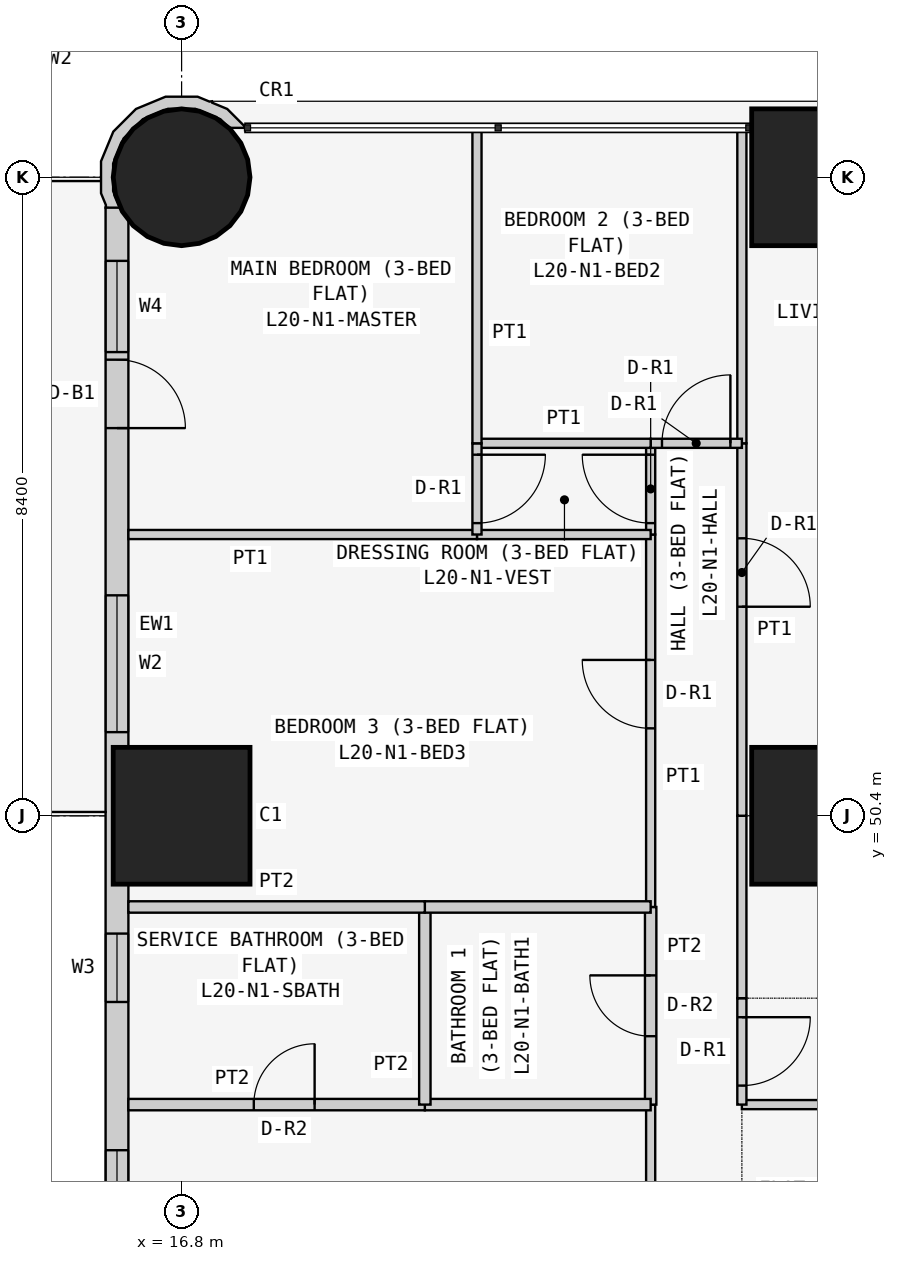
"""IFC4 building model, lengths in metres.
Left out: names, types, materials, properties, quantities, classifications, styles, units other than length and angle.
Written with IfcOpenShell. Run it as: python <this file> out.ifc"""

import sys

from ifc_helpers import new_model, si_unit, direction, frame, frame_2d, origin, origin_2d, place, context, subcontext, project, spatial, polyline, rectangle, circle, outline, extrude, element, fill, save


model = new_model("IFC4")
c1 = context("Model", 3, precision=1e-05, world=origin(), true_north=direction((0.0, 1.0)))
c2 = subcontext(c1, "Body", "Model", "MODEL_VIEW")
j1 = project(units=[si_unit("LENGTHUNIT", "METRE"), si_unit("PLANEANGLEUNIT", "RADIAN")], contexts=[c1])
p1 = place(None, origin())
s1 = spatial("IfcSite", under=j1, at=p1, CompositionType="ELEMENT")
p2 = place(p1, origin())
s2 = spatial("IfcBuilding", under=s1, at=p2, CompositionType="ELEMENT")
p3 = place(p2, frame((0.0, 0.0, 81.3)))
s3 = spatial("IfcBuildingStorey", under=s2, at=p3, CompositionType="ELEMENT", Elevation=81.3)
p4 = place(p3, frame((16.8, 50.4, 0.0), z_axis=(0.0, 0.0, 1.0), x_axis=(1.0, 0.0, 0.0)))
e1 = element("IfcColumn", 1, at=p4, inside=s3, PredefinedType="COLUMN", context=c2, shape_type="SweptSolid", body=[
    extrude(rectangle(XDim=1.8, YDim=1.8, at=origin_2d()), origin(), (0.0, 0.0, 1.0), 3.6),
])
p5 = place(p3, frame((16.8, 58.8, 0.0), z_axis=(0.0, 0.0, 1.0), x_axis=(1.0, 0.0, 0.0)))
e2 = element("IfcColumn", 2, at=p5, inside=s3, PredefinedType="COLUMN", context=c2, shape_type="SweptSolid", body=[
    extrude(circle(Radius=0.9, at=origin_2d()), origin(), (0.0, 0.0, 1.0), 3.6),
])
for number, where, z_axis, x_axis in (
    (3, (25.2, 50.4, 0.0), (0.0, 0.0, 1.0), (1.0, 0.0, 0.0)),
    (4, (25.2, 58.8, 0.0), (0.0, 0.0, 1.0), (1.0, 0.0, 0.0)),
):
    element("IfcColumn", number, at=place(p3, frame(where, z_axis=z_axis, x_axis=x_axis)), inside=s3, PredefinedType="COLUMN", context=c2, shape_type="SweptSolid", body=[
        extrude(rectangle(XDim=1.8, YDim=1.8, at=origin_2d()), origin(), (0.0, 0.0, 1.0), 3.6),
    ])
p6 = place(p3, frame((15.95, 58.4, 0.0), z_axis=(0.0, 0.0, 1.0), x_axis=(0.0, -1.0, 0.0)))
e5 = element("IfcWall", 5, at=p6, inside=s3, PredefinedType="SOLIDWALL", context=c2, shape_type="SweptSolid", body=[
    extrude(rectangle(XDim=15.7, YDim=0.3, at=frame_2d((7.85, 0.0))), origin(), (0.0, 0.0, 1.0), 3.45),
])
p7 = place(p6, frame((12.4, 0.0, 0.9)))
e6 = element("IfcOpeningElement", 6, at=p7, cuts=e5, PredefinedType="OPENING", context=c2, shape_type="SweptSolid", body=[
    extrude(rectangle(XDim=1.8, YDim=1.5, at=frame_2d((0.9, 0.75))), frame((0.0, 0.16, 0.0), z_axis=(0.0, -1.0, 0.0), x_axis=(1.0, 0.0, 0.0)), (0.0, 0.0, 1.0), 0.32),
])
p8 = place(p6, frame((9.55, 0.0, 1.5)))
e7 = element("IfcOpeningElement", 7, at=p8, cuts=e5, PredefinedType="OPENING", context=c2, shape_type="SweptSolid", body=[
    extrude(rectangle(XDim=0.9, YDim=0.7, at=frame_2d((0.45, 0.35))), frame((0.0, 0.16, 0.0), z_axis=(0.0, -1.0, 0.0), x_axis=(1.0, 0.0, 0.0)), (0.0, 0.0, 1.0), 0.32),
])
p9 = place(p6, frame((5.1, 0.0, 0.9)))
e8 = element("IfcOpeningElement", 8, at=p9, cuts=e5, PredefinedType="OPENING", context=c2, shape_type="SweptSolid", body=[
    extrude(rectangle(XDim=1.8, YDim=1.5, at=frame_2d((0.9, 0.75))), frame((0.0, 0.16, 0.0), z_axis=(0.0, -1.0, 0.0), x_axis=(1.0, 0.0, 0.0)), (0.0, 0.0, 1.0), 0.32),
])
p10 = place(p6, frame((2.0, 0.0, 0.0)))
e9 = element("IfcOpeningElement", 9, at=p10, cuts=e5, PredefinedType="OPENING", context=c2, shape_type="SweptSolid", body=[
    extrude(rectangle(XDim=0.9, YDim=2.4, at=frame_2d((0.45, 1.2))), frame((0.0, 0.16, 0.0), z_axis=(0.0, -1.0, 0.0), x_axis=(1.0, 0.0, 0.0)), (0.0, 0.0, 1.0), 0.32),
])
p11 = place(p6, frame((0.7, 0.0, 0.9)))
e10 = element("IfcOpeningElement", 10, at=p11, cuts=e5, PredefinedType="OPENING", context=c2, shape_type="SweptSolid", body=[
    extrude(rectangle(XDim=1.2, YDim=1.5, at=frame_2d((0.6, 0.75))), frame((0.0, 0.16, 0.0), z_axis=(0.0, -1.0, 0.0), x_axis=(1.0, 0.0, 0.0)), (0.0, 0.0, 1.0), 0.32),
])
p12 = place(p3, frame((17.567, 59.411, 0.0), z_axis=(0.0, 0.0, 1.0), x_axis=(-0.377204953059, 0.926129809145, 0.0)))
e11 = element("IfcWall", 11, at=p12, inside=s3, PredefinedType="SOLIDWALL", context=c2, shape_type="SweptSolid", body=[
    extrude(outline(polyline([(-0.27, 2.017), (-0.37, 1.841), (-0.102, 1.842), (0.23, 1.707), (0.484, 1.455), (0.624, 1.125), (0.626, 0.766), (0.491, 0.434), (0.239, 0.18), (0.09, 0.117), (0.011, -0.078), (0.024, -0.083), (0.329, 0.045), (0.48, 0.198), (0.499, 0.193), (0.508, 0.225), (0.626, 0.345), (0.785, 0.736), (0.782, 1.157), (0.619, 1.546), (0.319, 1.842), (-0.072, 2.002), (-0.24, 2.0), (-0.27, 2.017)])), origin(), (0.0, 0.0, 1.0), 3.45),
])
p13 = place(p3, frame((29.4, 46.6, 0.0), z_axis=(0.0, 0.0, 1.0), x_axis=(-1.0, 0.0, 0.0)))
e12 = element("IfcWall", 12, at=p13, inside=s3, PredefinedType="PARTITIONING", context=c2, shape_type="SweptSolid", body=[
    extrude(rectangle(XDim=5.229, YDim=0.12, at=frame_2d((2.615, 0.0))), origin(), (0.0, 0.0, 1.0), 3.45),
])
p14 = place(p3, frame((24.171, 48.0, 0.0), z_axis=(0.0, 0.0, 1.0), x_axis=(0.0, -1.0, 0.0)))
e13 = element("IfcWall", 13, at=p14, inside=s3, PredefinedType="PARTITIONING", context=c2, shape_type="SweptSolid", body=[
    extrude(rectangle(XDim=1.4, YDim=0.12, at=frame_2d((0.7, 0.0))), origin(), (0.0, 0.0, 1.0), 3.45),
])
p15 = place(p14, frame((0.25, 0.0, 0.0)))
e14 = element("IfcOpeningElement", 14, at=p15, cuts=e13, PredefinedType="OPENING", context=c2, shape_type="SweptSolid", body=[
    extrude(rectangle(XDim=0.9, YDim=2.1, at=frame_2d((0.45, 1.05))), frame((0.0, 0.07, 0.0), z_axis=(0.0, -1.0, 0.0), x_axis=(1.0, 0.0, 0.0)), (0.0, 0.0, 1.0), 0.14),
])
p16 = place(p3, frame((24.171, 50.4, 0.0), z_axis=(0.0, 0.0, 1.0), x_axis=(0.0, -1.0, 0.0)))
e15 = element("IfcWall", 15, at=p16, inside=s3, PredefinedType="PARTITIONING", context=c2, shape_type="SweptSolid", body=[
    extrude(rectangle(XDim=2.4, YDim=0.12, at=frame_2d((1.2, 0.0))), origin(), (0.0, 0.0, 1.0), 3.45),
])
p17 = place(p3, frame((24.171, 55.3, 0.0), z_axis=(0.0, 0.0, 1.0), x_axis=(0.0, -1.0, 0.0)))
e16 = element("IfcWall", 16, at=p17, inside=s3, PredefinedType="PARTITIONING", context=c2, shape_type="SweptSolid", body=[
    extrude(rectangle(XDim=4.9, YDim=0.12, at=frame_2d((2.45, 0.0))), origin(), (0.0, 0.0, 1.0), 3.45),
])
p18 = place(p17, frame((1.25, 0.0, 0.0)))
e17 = element("IfcOpeningElement", 17, at=p18, cuts=e16, PredefinedType="OPENING", context=c2, shape_type="SweptSolid", body=[
    extrude(rectangle(XDim=0.9, YDim=2.1, at=frame_2d((0.45, 1.05))), frame((0.0, 0.07, 0.0), z_axis=(0.0, -1.0, 0.0), x_axis=(1.0, 0.0, 0.0)), (0.0, 0.0, 1.0), 0.14),
])
p19 = place(p3, frame((24.171, 59.45, 0.0), z_axis=(0.0, 0.0, 1.0), x_axis=(0.0, -1.0, 0.0)))
e18 = element("IfcWall", 18, at=p19, inside=s3, PredefinedType="PARTITIONING", context=c2, shape_type="SweptSolid", body=[
    extrude(rectangle(XDim=4.15, YDim=0.12, at=frame_2d((2.075, 0.0))), origin(), (0.0, 0.0, 1.0), 3.45),
])
p20 = place(p3, frame((22.971, 46.6, 0.0), z_axis=(0.0, 0.0, 1.0), x_axis=(0.0, -1.0, 0.0)))
e19 = element("IfcWall", 19, at=p20, inside=s3, PredefinedType="PARTITIONING", context=c2, shape_type="SweptSolid", body=[
    extrude(rectangle(XDim=3.575, YDim=0.12, at=frame_2d((1.788, 0.0))), origin(), (0.0, 0.0, 1.0), 3.45),
])
p21 = place(p20, frame((1.35, 0.0, 0.0)))
e20 = element("IfcOpeningElement", 20, at=p21, cuts=e19, PredefinedType="OPENING", context=c2, shape_type="SweptSolid", body=[
    extrude(rectangle(XDim=0.9, YDim=2.1, at=frame_2d((0.45, 1.05))), frame((0.0, 0.07, 0.0), z_axis=(0.0, -1.0, 0.0), x_axis=(1.0, 0.0, 0.0)), (0.0, 0.0, 1.0), 0.14),
])
p22 = place(p3, frame((22.971, 49.2, 0.0), z_axis=(0.0, 0.0, 1.0), x_axis=(0.0, -1.0, 0.0)))
e21 = element("IfcWall", 21, at=p22, inside=s3, PredefinedType="PARTITIONING", context=c2, shape_type="SweptSolid", body=[
    extrude(rectangle(XDim=2.6, YDim=0.15, at=frame_2d((1.3, 0.0))), origin(), (0.0, 0.0, 1.0), 3.45),
])
p23 = place(p22, frame((0.9, 0.0, 0.0)))
e22 = element("IfcOpeningElement", 22, at=p23, cuts=e21, PredefinedType="OPENING", context=c2, shape_type="SweptSolid", body=[
    extrude(rectangle(XDim=0.8, YDim=2.1, at=frame_2d((0.4, 1.05))), frame((0.0, 0.085, 0.0), z_axis=(0.0, -1.0, 0.0), x_axis=(1.0, 0.0, 0.0)), (0.0, 0.0, 1.0), 0.17),
])
p24 = place(p3, frame((22.971, 54.1, 0.0), z_axis=(0.0, 0.0, 1.0), x_axis=(0.0, -1.0, 0.0)))
e23 = element("IfcWall", 23, at=p24, inside=s3, PredefinedType="PARTITIONING", context=c2, shape_type="SweptSolid", body=[
    extrude(rectangle(XDim=4.9, YDim=0.12, at=frame_2d((2.45, 0.0))), origin(), (0.0, 0.0, 1.0), 3.45),
])
p25 = place(p24, frame((1.65, 0.0, 0.0)))
e24 = element("IfcOpeningElement", 24, at=p25, cuts=e23, PredefinedType="OPENING", context=c2, shape_type="SweptSolid", body=[
    extrude(rectangle(XDim=0.9, YDim=2.1, at=frame_2d((0.45, 1.05))), frame((0.0, 0.07, 0.0), z_axis=(0.0, -1.0, 0.0), x_axis=(1.0, 0.0, 0.0)), (0.0, 0.0, 1.0), 0.14),
])
p26 = place(p3, frame((22.971, 55.3, 0.0), z_axis=(0.0, 0.0, 1.0), x_axis=(0.0, -1.0, 0.0)))
e25 = element("IfcWall", 25, at=p26, inside=s3, PredefinedType="PARTITIONING", context=c2, shape_type="SweptSolid", body=[
    extrude(rectangle(XDim=1.2, YDim=0.12, at=frame_2d((0.6, 0.0))), origin(), (0.0, 0.0, 1.0), 3.45),
])
p27 = place(p26, frame((0.15, 0.0, 0.0)))
e26 = element("IfcOpeningElement", 26, at=p27, cuts=e25, PredefinedType="OPENING", context=c2, shape_type="SweptSolid", body=[
    extrude(rectangle(XDim=0.9, YDim=2.1, at=frame_2d((0.45, 1.05))), frame((0.0, 0.07, 0.0), z_axis=(0.0, -1.0, 0.0), x_axis=(1.0, 0.0, 0.0)), (0.0, 0.0, 1.0), 0.14),
])
p28 = place(p3, frame((24.171, 55.3, 0.0), z_axis=(0.0, 0.0, 1.0), x_axis=(-1.0, 0.0, 0.0)))
e27 = element("IfcWall", 27, at=p28, inside=s3, PredefinedType="PARTITIONING", context=c2, shape_type="SweptSolid", body=[
    extrude(rectangle(XDim=1.2, YDim=0.12, at=frame_2d((0.6, 0.0))), origin(), (0.0, 0.0, 1.0), 3.45),
])
p29 = place(p28, frame((0.151, 0.0, 0.0)))
e28 = element("IfcOpeningElement", 28, at=p29, cuts=e27, PredefinedType="OPENING", context=c2, shape_type="SweptSolid", body=[
    extrude(rectangle(XDim=0.9, YDim=2.1, at=frame_2d((0.45, 1.05))), frame((0.0, 0.07, 0.0), z_axis=(0.0, -1.0, 0.0), x_axis=(1.0, 0.0, 0.0)), (0.0, 0.0, 1.0), 0.14),
])
p30 = place(p3, frame((22.971, 46.6, 0.0), z_axis=(0.0, 0.0, 1.0), x_axis=(-1.0, 0.0, 0.0)))
e29 = element("IfcWall", 29, at=p30, inside=s3, PredefinedType="PARTITIONING", context=c2, shape_type="SweptSolid", body=[
    extrude(rectangle(XDim=2.971, YDim=0.15, at=frame_2d((1.485, 0.0))), origin(), (0.0, 0.0, 1.0), 3.45),
])
p31 = place(p3, frame((20.0, 46.6, 0.0), z_axis=(0.0, 0.0, 1.0), x_axis=(-1.0, 0.0, 0.0)))
e30 = element("IfcWall", 30, at=p31, inside=s3, PredefinedType="PARTITIONING", context=c2, shape_type="SweptSolid", body=[
    extrude(rectangle(XDim=3.9, YDim=0.15, at=frame_2d((1.95, 0.0))), origin(), (0.0, 0.0, 1.0), 3.45),
])
p32 = place(p31, frame((1.45, 0.0, 0.0)))
e31 = element("IfcOpeningElement", 31, at=p32, cuts=e30, PredefinedType="OPENING", context=c2, shape_type="SweptSolid", body=[
    extrude(rectangle(XDim=0.8, YDim=2.1, at=frame_2d((0.4, 1.05))), frame((0.0, 0.085, 0.0), z_axis=(0.0, -1.0, 0.0), x_axis=(1.0, 0.0, 0.0)), (0.0, 0.0, 1.0), 0.17),
])
p33 = place(p3, frame((20.0, 49.2, 0.0), z_axis=(0.0, 0.0, 1.0), x_axis=(0.0, -1.0, 0.0)))
e32 = element("IfcWall", 32, at=p33, inside=s3, PredefinedType="PARTITIONING", context=c2, shape_type="SweptSolid", body=[
    extrude(rectangle(XDim=2.6, YDim=0.15, at=frame_2d((1.3, 0.0))), origin(), (0.0, 0.0, 1.0), 3.45),
])
p34 = place(p3, frame((22.971, 49.2, 0.0), z_axis=(0.0, 0.0, 1.0), x_axis=(-1.0, 0.0, 0.0)))
e33 = element("IfcWall", 33, at=p34, inside=s3, PredefinedType="PARTITIONING", context=c2, shape_type="SweptSolid", body=[
    extrude(rectangle(XDim=2.971, YDim=0.15, at=frame_2d((1.485, 0.0))), origin(), (0.0, 0.0, 1.0), 3.45),
])
p35 = place(p3, frame((20.0, 49.2, 0.0), z_axis=(0.0, 0.0, 1.0), x_axis=(-1.0, 0.0, 0.0)))
e34 = element("IfcWall", 34, at=p35, inside=s3, PredefinedType="PARTITIONING", context=c2, shape_type="SweptSolid", body=[
    extrude(rectangle(XDim=3.9, YDim=0.15, at=frame_2d((1.95, 0.0))), origin(), (0.0, 0.0, 1.0), 3.45),
])
p36 = place(p3, frame((22.971, 54.1, 0.0), z_axis=(0.0, 0.0, 1.0), x_axis=(-1.0, 0.0, 0.0)))
e35 = element("IfcWall", 35, at=p36, inside=s3, PredefinedType="PARTITIONING", context=c2, shape_type="SweptSolid", body=[
    extrude(rectangle(XDim=2.285, YDim=0.12, at=frame_2d((1.143, 0.0))), origin(), (0.0, 0.0, 1.0), 3.45),
])
p37 = place(p3, frame((20.686, 54.1, 0.0), z_axis=(0.0, 0.0, 1.0), x_axis=(-1.0, 0.0, 0.0)))
e36 = element("IfcWall", 36, at=p37, inside=s3, PredefinedType="PARTITIONING", context=c2, shape_type="SweptSolid", body=[
    extrude(rectangle(XDim=4.586, YDim=0.12, at=frame_2d((2.293, 0.0))), origin(), (0.0, 0.0, 1.0), 3.45),
])
p38 = place(p3, frame((22.971, 55.3, 0.0), z_axis=(0.0, 0.0, 1.0), x_axis=(-1.0, 0.0, 0.0)))
e37 = element("IfcWall", 37, at=p38, inside=s3, PredefinedType="PARTITIONING", context=c2, shape_type="SweptSolid", body=[
    extrude(rectangle(XDim=2.285, YDim=0.12, at=frame_2d((1.143, 0.0))), origin(), (0.0, 0.0, 1.0), 3.45),
])
p39 = place(p3, frame((20.686, 55.3, 0.0), z_axis=(0.0, 0.0, 1.0), x_axis=(0.0, -1.0, 0.0)))
e38 = element("IfcWall", 38, at=p39, inside=s3, PredefinedType="PARTITIONING", context=c2, shape_type="SweptSolid", body=[
    extrude(rectangle(XDim=1.2, YDim=0.12, at=frame_2d((0.6, 0.0))), origin(), (0.0, 0.0, 1.0), 3.45),
])
p40 = place(p39, frame((0.15, 0.0, 0.0)))
e39 = element("IfcOpeningElement", 39, at=p40, cuts=e38, PredefinedType="OPENING", context=c2, shape_type="SweptSolid", body=[
    extrude(rectangle(XDim=0.9, YDim=2.1, at=frame_2d((0.45, 1.05))), frame((0.0, 0.07, 0.0), z_axis=(0.0, -1.0, 0.0), x_axis=(1.0, 0.0, 0.0)), (0.0, 0.0, 1.0), 0.14),
])
p41 = place(p3, frame((20.686, 59.45, 0.0), z_axis=(0.0, 0.0, 1.0), x_axis=(0.0, -1.0, 0.0)))
e40 = element("IfcWall", 40, at=p41, inside=s3, PredefinedType="PARTITIONING", context=c2, shape_type="SweptSolid", body=[
    extrude(rectangle(XDim=4.15, YDim=0.12, at=frame_2d((2.075, 0.0))), origin(), (0.0, 0.0, 1.0), 3.45),
])
p42 = place(p7, origin())
e41 = element("IfcWindow", 41, at=p42, inside=s3, PartitioningType="SINGLE_PANEL", PredefinedType="WINDOW", context=c2, shape_type="SweptSolid", body=[
    extrude(rectangle(XDim=1.8, YDim=1.5, at=frame_2d((0.9, 0.75))), frame((0.0, 0.03, 0.0), z_axis=(0.0, -1.0, 0.0), x_axis=(1.0, 0.0, 0.0)), (0.0, 0.0, 1.0), 0.06),
])
fill(e6, e41)
p43 = place(p8, origin())
e42 = element("IfcWindow", 42, at=p43, inside=s3, PartitioningType="SINGLE_PANEL", PredefinedType="WINDOW", context=c2, shape_type="SweptSolid", body=[
    extrude(rectangle(XDim=0.9, YDim=0.7, at=frame_2d((0.45, 0.35))), frame((0.0, 0.03, 0.0), z_axis=(0.0, -1.0, 0.0), x_axis=(1.0, 0.0, 0.0)), (0.0, 0.0, 1.0), 0.06),
])
fill(e7, e42)
p44 = place(p9, origin())
e43 = element("IfcWindow", 43, at=p44, inside=s3, PartitioningType="SINGLE_PANEL", PredefinedType="WINDOW", context=c2, shape_type="SweptSolid", body=[
    extrude(rectangle(XDim=1.8, YDim=1.5, at=frame_2d((0.9, 0.75))), frame((0.0, 0.03, 0.0), z_axis=(0.0, -1.0, 0.0), x_axis=(1.0, 0.0, 0.0)), (0.0, 0.0, 1.0), 0.06),
])
fill(e8, e43)
p45 = place(p10, origin())
e44 = element("IfcDoor", 44, at=p45, inside=s3, OperationType="SINGLE_SWING_RIGHT", PredefinedType="DOOR", context=c2, shape_type="SweptSolid", body=[
    extrude(rectangle(XDim=0.9, YDim=2.4, at=frame_2d((0.45, 1.2))), frame((0.0, 0.025, 0.0), z_axis=(0.0, -1.0, 0.0), x_axis=(1.0, 0.0, 0.0)), (0.0, 0.0, 1.0), 0.05),
])
fill(e9, e44)
p46 = place(p11, origin())
e45 = element("IfcWindow", 45, at=p46, inside=s3, PartitioningType="SINGLE_PANEL", PredefinedType="WINDOW", context=c2, shape_type="SweptSolid", body=[
    extrude(rectangle(XDim=1.2, YDim=1.5, at=frame_2d((0.6, 0.75))), frame((0.0, 0.03, 0.0), z_axis=(0.0, -1.0, 0.0), x_axis=(1.0, 0.0, 0.0)), (0.0, 0.0, 1.0), 0.06),
])
fill(e10, e45)
p47 = place(p15, origin())
e46 = element("IfcDoor", 46, at=p47, inside=s3, OperationType="SINGLE_SWING_LEFT", PredefinedType="DOOR", context=c2, shape_type="SweptSolid", body=[
    extrude(rectangle(XDim=0.9, YDim=2.1, at=frame_2d((0.45, 1.05))), frame((0.0, 0.025, 0.0), z_axis=(0.0, -1.0, 0.0), x_axis=(1.0, 0.0, 0.0)), (0.0, 0.0, 1.0), 0.05),
])
fill(e14, e46)
p48 = place(p18, origin())
e47 = element("IfcDoor", 47, at=p48, inside=s3, OperationType="SINGLE_SWING_RIGHT", PredefinedType="DOOR", context=c2, shape_type="SweptSolid", body=[
    extrude(rectangle(XDim=0.9, YDim=2.1, at=frame_2d((0.45, 1.05))), frame((0.0, 0.025, 0.0), z_axis=(0.0, -1.0, 0.0), x_axis=(1.0, 0.0, 0.0)), (0.0, 0.0, 1.0), 0.05),
])
fill(e17, e47)
p49 = place(p32, frame((0.8, 0.0, 0.0), z_axis=(0.0, 0.0, 1.0), x_axis=(-1.0, 0.0, 0.0)))
e48 = element("IfcDoor", 48, at=p49, inside=s3, OperationType="SINGLE_SWING_RIGHT", PredefinedType="DOOR", context=c2, shape_type="SweptSolid", body=[
    extrude(rectangle(XDim=0.8, YDim=2.1, at=frame_2d((0.4, 1.05))), frame((0.0, 0.025, 0.0), z_axis=(0.0, -1.0, 0.0), x_axis=(1.0, 0.0, 0.0)), (0.0, 0.0, 1.0), 0.05),
])
fill(e31, e48)
p50 = place(p23, frame((0.8, 0.0, 0.0), z_axis=(0.0, 0.0, 1.0), x_axis=(-1.0, 0.0, 0.0)))
e49 = element("IfcDoor", 49, at=p50, inside=s3, OperationType="SINGLE_SWING_RIGHT", PredefinedType="DOOR", context=c2, shape_type="SweptSolid", body=[
    extrude(rectangle(XDim=0.8, YDim=2.1, at=frame_2d((0.4, 1.05))), frame((0.0, 0.025, 0.0), z_axis=(0.0, -1.0, 0.0), x_axis=(1.0, 0.0, 0.0)), (0.0, 0.0, 1.0), 0.05),
])
fill(e22, e49)
p51 = place(p25, frame((0.9, 0.0, 0.0), z_axis=(0.0, 0.0, 1.0), x_axis=(-1.0, 0.0, 0.0)))
e50 = element("IfcDoor", 50, at=p51, inside=s3, OperationType="SINGLE_SWING_RIGHT", PredefinedType="DOOR", context=c2, shape_type="SweptSolid", body=[
    extrude(rectangle(XDim=0.9, YDim=2.1, at=frame_2d((0.45, 1.05))), frame((0.0, 0.025, 0.0), z_axis=(0.0, -1.0, 0.0), x_axis=(1.0, 0.0, 0.0)), (0.0, 0.0, 1.0), 0.05),
])
fill(e24, e50)
p52 = place(p27, frame((0.9, 0.0, 0.0), z_axis=(0.0, 0.0, 1.0), x_axis=(-1.0, 0.0, 0.0)))
e51 = element("IfcDoor", 51, at=p52, inside=s3, OperationType="SINGLE_SWING_RIGHT", PredefinedType="DOOR", context=c2, shape_type="SweptSolid", body=[
    extrude(rectangle(XDim=0.9, YDim=2.1, at=frame_2d((0.45, 1.05))), frame((0.0, 0.025, 0.0), z_axis=(0.0, -1.0, 0.0), x_axis=(1.0, 0.0, 0.0)), (0.0, 0.0, 1.0), 0.05),
])
fill(e26, e51)
p53 = place(p40, origin())
e52 = element("IfcDoor", 52, at=p53, inside=s3, OperationType="SINGLE_SWING_LEFT", PredefinedType="DOOR", context=c2, shape_type="SweptSolid", body=[
    extrude(rectangle(XDim=0.9, YDim=2.1, at=frame_2d((0.45, 1.05))), frame((0.0, 0.025, 0.0), z_axis=(0.0, -1.0, 0.0), x_axis=(1.0, 0.0, 0.0)), (0.0, 0.0, 1.0), 0.05),
])
fill(e39, e52)
p54 = place(p29, frame((0.9, 0.0, 0.0), z_axis=(0.0, 0.0, 1.0), x_axis=(-1.0, 0.0, 0.0)))
e53 = element("IfcDoor", 53, at=p54, inside=s3, OperationType="SINGLE_SWING_RIGHT", PredefinedType="DOOR", context=c2, shape_type="SweptSolid", body=[
    extrude(rectangle(XDim=0.9, YDim=2.1, at=frame_2d((0.45, 1.05))), frame((0.0, 0.025, 0.0), z_axis=(0.0, -1.0, 0.0), x_axis=(1.0, 0.0, 0.0)), (0.0, 0.0, 1.0), 0.05),
])
fill(e28, e53)
save(model, sys.argv[1])
